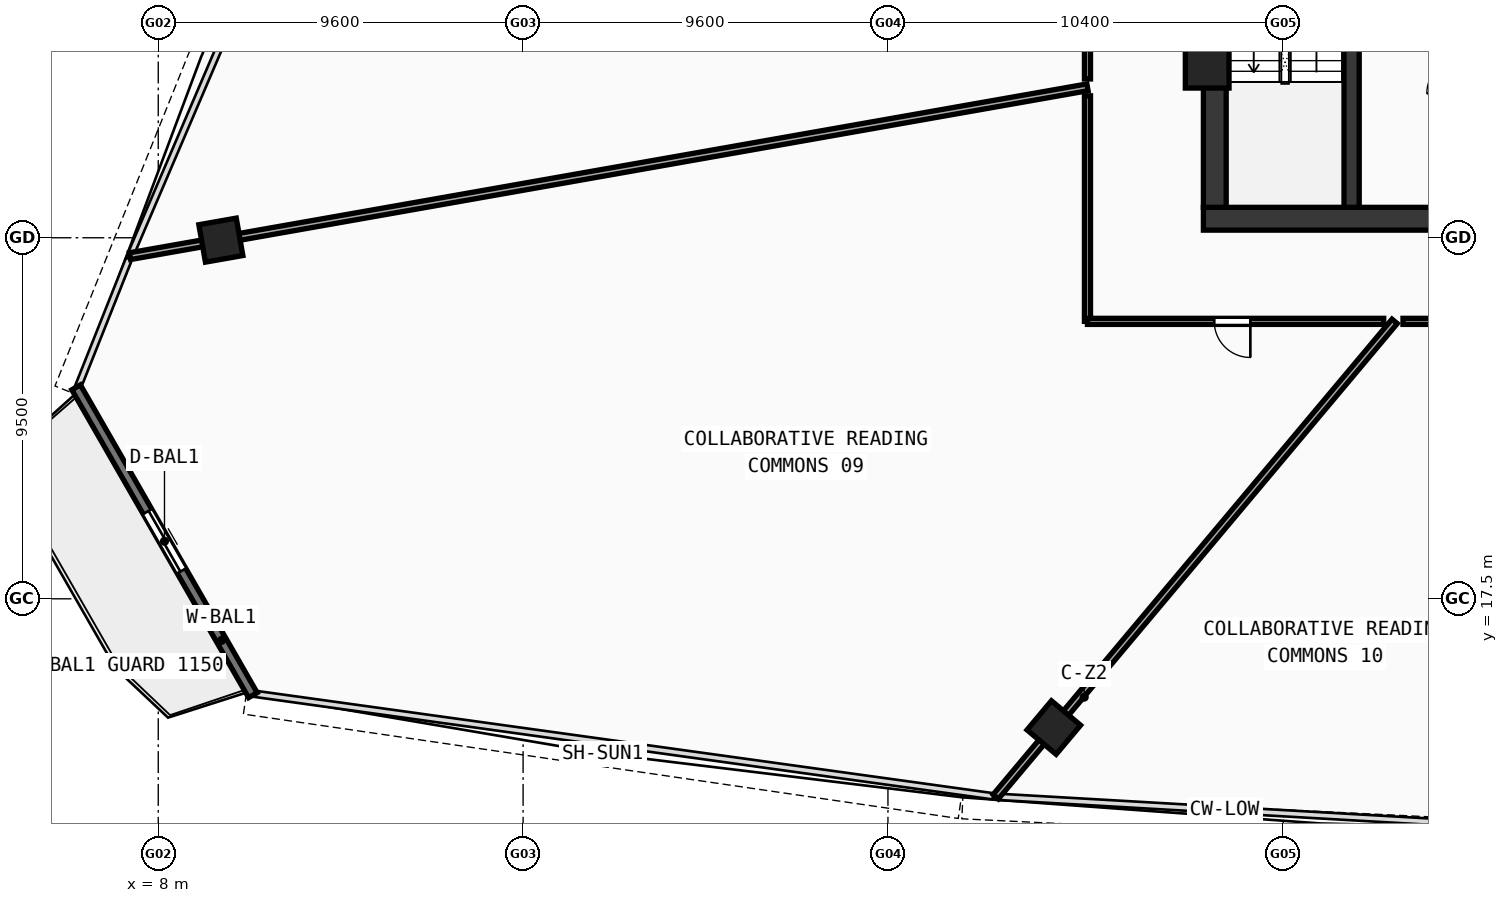
"""IFC4 building model, lengths in metres.
Left out: names, types, materials, properties, quantities, classifications, styles, units other than length and angle.
Written with IfcOpenShell. Run it as: python <this file> out.ifc"""

import sys

from ifc_helpers import new_model, si_unit, direction, frame, frame_2d, origin, origin_with_axes, origin_2d, place, context, subcontext, project, spatial, rectangle, hollow_rectangle, extrude, source, transform, mapped, element, fill, save


model = new_model("IFC4")
c1 = context("Model", 3, precision=1e-05, world=origin(), true_north=direction((0.0, 1.0)))
c2 = subcontext(c1, "Body", "Model", "MODEL_VIEW")
j1 = project(units=[si_unit("LENGTHUNIT", "METRE"), si_unit("PLANEANGLEUNIT", "RADIAN")], contexts=[c1])
p1 = place(None, origin())
s1 = spatial("IfcSite", under=j1, at=p1, CompositionType="ELEMENT")
p2 = place(p1, origin())
s2 = spatial("IfcBuilding", under=s1, at=p2, CompositionType="ELEMENT")
p3 = place(p2, frame((0.0, 0.0, 88.78)))
s3 = spatial("IfcBuildingStorey", under=s2, at=p3, CompositionType="ELEMENT", Elevation=88.78)
p4 = place(p3, frame((35.5, 27.5, 0.0), z_axis=(0.0, 0.0, 1.0), x_axis=(1.0, 0.0, 0.0)))
e1 = element("IfcWall", 1, at=p4, inside=s3, PredefinedType="SHEAR", context=c2, shape_type="SweptSolid", body=[
    extrude(rectangle(XDim=25.0, YDim=0.6, at=frame_2d((12.5, 0.0))), origin(), (0.0, 0.0, 1.0), 3.54),
])
p5 = place(p3, frame((35.8, 27.8, 0.0), z_axis=(0.0, 0.0, 1.0), x_axis=(0.0, 1.0, 0.0)))
e2 = element("IfcWall", 2, at=p5, inside=s3, PredefinedType="SHEAR", context=c2, shape_type="SweptSolid", body=[
    extrude(rectangle(XDim=12.1, YDim=0.6, at=frame_2d((6.05, 0.0))), origin(), (0.0, 0.0, 1.0), 3.54),
])
p6 = place(p3, frame((39.4, 27.8, 0.0), z_axis=(0.0, 0.0, 1.0), x_axis=(0.0, 1.0, 0.0)))
e3 = element("IfcWall", 3, at=p6, inside=s3, PredefinedType="SHEAR", context=c2, shape_type="SweptSolid", body=[
    extrude(rectangle(XDim=12.1, YDim=0.4, at=frame_2d((6.05, 0.0))), origin(), (0.0, 0.0, 1.0), 3.54),
])
p7 = place(p6, frame((9.95, 0.0, 0.0)))
e4 = element("IfcOpeningElement", 4, at=p7, cuts=e3, PredefinedType="OPENING", context=c2, shape_type="SweptSolid", body=[
    extrude(rectangle(XDim=1.1, YDim=2.1, at=frame_2d((0.55, 1.05))), frame((0.0, 0.21, 0.0), z_axis=(0.0, -1.0, 0.0), x_axis=(1.0, 0.0, 0.0)), (0.0, 0.0, 1.0), 0.42),
])
m1 = source(origin(), c2, "Body", "SweptSolid", [
    extrude(hollow_rectangle(XDim=1.15, YDim=1.15, WallThickness=0.048, at=origin_2d()), origin(), (0.0, 0.0, 1.0), 3.8),
])
p8 = place(p3, frame((35.6, 31.513, -0.26), z_axis=(0.0, 0.0, 1.0), x_axis=(1.0, 0.0, 0.0)))
e5 = element("IfcColumn", 5, at=p8, inside=s3, PredefinedType="COLUMN", context=c2, shape_type="MappedRepresentation", body=[
    mapped(m1, transform((0.0, 0.0, 0.0), scale=1.0)),
])
m2 = source(origin(), c2, "Body", "SweptSolid", [
    extrude(hollow_rectangle(XDim=1.0, YDim=1.0, WallThickness=0.042, at=origin_2d()), origin(), (0.0, 0.0, 1.0), 3.8),
])
for number, where, z_axis, x_axis in (
    (6, (31.564, 14.112, -0.26), (0.0, 0.0, 1.0), (0.766, -0.643, 0.0)),
    (7, (9.647, 26.938, -0.26), (0.0, 0.0, 1.0), (0.174, -0.985, 0.0)),
):
    element("IfcColumn", number, at=place(p3, frame(where, z_axis=z_axis, x_axis=x_axis)), inside=s3, PredefinedType="COLUMN", context=c2, shape_type="MappedRepresentation", body=[
        mapped(m2, transform((0.0, 0.0, 0.0), scale=1.0)),
    ])
p9 = place(p3, frame((5.838, 23.065, 0.0), z_axis=(0.0, 0.0, 1.0), x_axis=(0.497922114025, -0.867221752705, 0.0)))
e8 = element("IfcWall", 8, at=p9, inside=s3, PredefinedType="STANDARD", context=c2, shape_type="SweptSolid", body=[
    extrude(rectangle(XDim=9.343, YDim=0.26, at=frame_2d((4.671, 0.0))), origin(), (0.0, 0.0, 1.0), 3.54),
])
p10 = place(p9, frame((3.771, 0.0, 0.0)))
e9 = element("IfcOpeningElement", 9, at=p10, cuts=e8, PredefinedType="OPENING", context=c2, shape_type="SweptSolid", body=[
    extrude(rectangle(XDim=1.8, YDim=2.15, at=frame_2d((0.9, 1.075))), frame((0.0, 0.14, 0.0), z_axis=(0.0, -1.0, 0.0), x_axis=(1.0, 0.0, 0.0)), (0.0, 0.0, 1.0), 0.28),
])
p11 = place(p3, frame((32.45, 30.958, 0.0), z_axis=(0.0, 0.0, 1.0), x_axis=(-0.984808048641, -0.173646501066, 0.0)))
e10 = element("IfcWall", 10, at=p11, inside=s3, PredefinedType="PARTITIONING", context=c2, shape_type="SweptSolid", body=[
    extrude(rectangle(XDim=25.582, YDim=0.18, at=frame_2d((12.791, 0.0))), origin(), (0.0, 0.0, 1.0), 2.84),
])
p12 = place(p3, frame((40.532, 24.8, 0.0), z_axis=(0.0, 0.0, 1.0), x_axis=(-0.642790086939, -0.76604236445, 0.0)))
e11 = element("IfcWall", 11, at=p12, inside=s3, PredefinedType="PARTITIONING", context=c2, shape_type="SweptSolid", body=[
    extrude(rectangle(XDim=16.326, YDim=0.18, at=frame_2d((8.163, 0.0))), origin(), (0.0, 0.0, 1.0), 2.84),
])
p13 = place(p3, frame((32.45, 24.8, 0.0), z_axis=(0.0, 0.0, 1.0), x_axis=(0.0, 1.0, 0.0)))
e12 = element("IfcWall", 12, at=p13, inside=s3, PredefinedType="PARTITIONING", context=c2, shape_type="SweptSolid", body=[
    extrude(rectangle(XDim=5.935, YDim=0.16, at=frame_2d((2.967, 0.0))), origin(), (0.0, 0.0, 1.0), 3.14),
])
p14 = place(p3, frame((32.45, 31.178, 0.0), z_axis=(0.0, 0.0, 1.0), x_axis=(0.0, 1.0, 0.0)))
e13 = element("IfcWall", 13, at=p14, inside=s3, PredefinedType="PARTITIONING", context=c2, shape_type="SweptSolid", body=[
    extrude(rectangle(XDim=16.304, YDim=0.16, at=frame_2d((8.152, 0.0))), origin(), (0.0, 0.0, 1.0), 2.84),
])
p15 = place(p14, frame((7.677, 0.0, 0.0)))
e14 = element("IfcOpeningElement", 14, at=p15, cuts=e13, PredefinedType="OPENING", context=c2, shape_type="SweptSolid", body=[
    extrude(rectangle(XDim=0.95, YDim=2.1, at=frame_2d((0.475, 1.05))), frame((0.0, 0.09, 0.0), z_axis=(0.0, -1.0, 0.0), x_axis=(1.0, 0.0, 0.0)), (0.0, 0.0, 1.0), 0.18),
])
p16 = place(p3, frame((45.387, 24.8, 0.0), z_axis=(0.0, 0.0, 1.0), x_axis=(-1.0, 0.0, 0.0)))
e15 = element("IfcWall", 15, at=p16, inside=s3, PredefinedType="PARTITIONING", context=c2, shape_type="SweptSolid", body=[
    extrude(rectangle(XDim=4.635, YDim=0.16, at=frame_2d((2.318, 0.0))), origin(), (0.0, 0.0, 1.0), 2.84),
])
p17 = place(p16, frame((1.839, 0.0, 0.0)))
e16 = element("IfcOpeningElement", 16, at=p17, cuts=e15, PredefinedType="OPENING", context=c2, shape_type="SweptSolid", body=[
    extrude(rectangle(XDim=0.95, YDim=2.1, at=frame_2d((0.475, 1.05))), frame((0.0, 0.09, 0.0), z_axis=(0.0, -1.0, 0.0), x_axis=(1.0, 0.0, 0.0)), (0.0, 0.0, 1.0), 0.18),
])
p18 = place(p3, frame((40.245, 24.8, 0.0), z_axis=(0.0, 0.0, 1.0), x_axis=(-1.0, 0.0, 0.0)))
e17 = element("IfcWall", 17, at=p18, inside=s3, PredefinedType="PARTITIONING", context=c2, shape_type="SweptSolid", body=[
    extrude(rectangle(XDim=7.795, YDim=0.16, at=frame_2d((3.897, 0.0))), origin(), (0.0, 0.0, 1.0), 3.14),
])
p19 = place(p18, frame((3.509, 0.0, 0.0)))
e18 = element("IfcOpeningElement", 18, at=p19, cuts=e17, PredefinedType="OPENING", context=c2, shape_type="SweptSolid", body=[
    extrude(rectangle(XDim=0.95, YDim=2.1, at=frame_2d((0.475, 1.05))), frame((0.0, 0.09, 0.0), z_axis=(0.0, -1.0, 0.0), x_axis=(1.0, 0.0, 0.0)), (0.0, 0.0, 1.0), 0.18),
])
m3 = source(origin(), c2, "Body", "SweptSolid", [
    extrude(rectangle(XDim=1.8, YDim=2.15, at=frame_2d((0.9, 1.075))), frame((0.0, 0.025, 0.0), z_axis=(0.0, -1.0, 0.0), x_axis=(1.0, 0.0, 0.0)), (0.0, 0.0, 1.0), 0.05),
])
p20 = place(p10, origin_with_axes())
e19 = element("IfcDoor", 19, at=p20, inside=s3, OperationType="DOUBLE_DOOR_SLIDING", PredefinedType="DOOR", context=c2, shape_type="MappedRepresentation", body=[
    mapped(m3, transform((0.0, 0.0, 0.0), scale=1.0)),
])
fill(e9, e19)
m4 = source(origin(), c2, "Body", "SweptSolid", [
    extrude(rectangle(XDim=0.95, YDim=2.1, at=frame_2d((0.475, 1.05))), frame((0.0, 0.025, 0.0), z_axis=(0.0, -1.0, 0.0), x_axis=(1.0, 0.0, 0.0)), (0.0, 0.0, 1.0), 0.05),
])
p21 = place(p19, origin_with_axes())
e20 = element("IfcDoor", 20, at=p21, inside=s3, OperationType="SINGLE_SWING_LEFT", PredefinedType="DOOR", context=c2, shape_type="MappedRepresentation", body=[
    mapped(m4, transform((0.0, 0.0, 0.0), scale=1.0)),
])
fill(e18, e20)
save(model, sys.argv[1])
